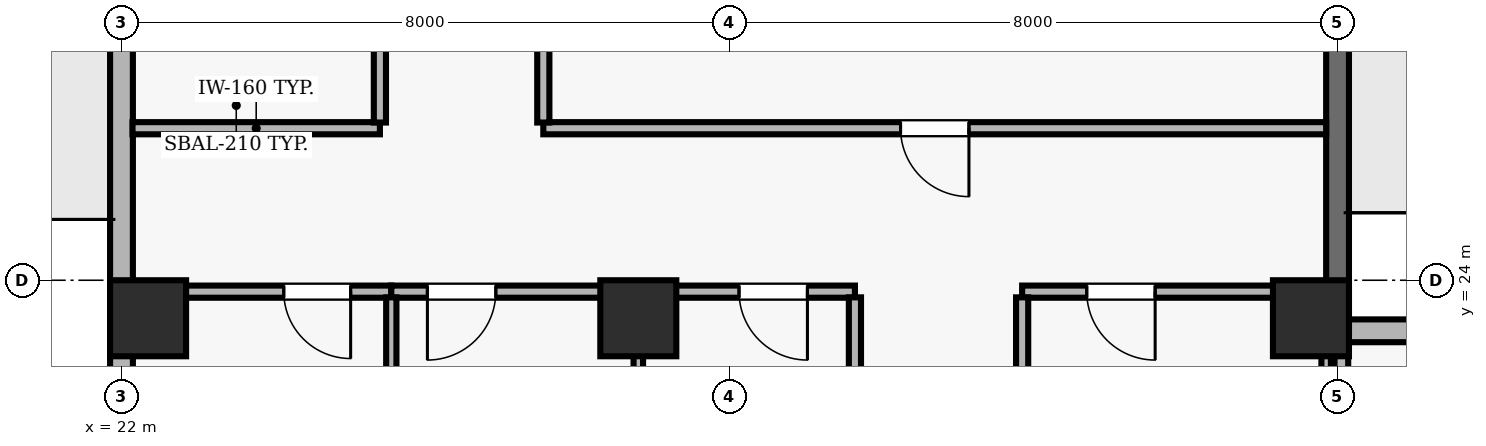
"""IFC4 building model, lengths in metres.
Left out: names, types, materials, properties, quantities, classifications, styles, units other than length and angle.
Written with IfcOpenShell. Run it as: python <this file> out.ifc"""

import sys

from ifc_helpers import new_model, si_unit, direction, frame, frame_2d, origin, origin_2d, place, context, subcontext, project, spatial, rectangle, extrude, element, fill, save


model = new_model("IFC4")
c1 = context("Model", 3, precision=1e-05, world=origin(), true_north=direction((0.0, 1.0)))
c2 = subcontext(c1, "Body", "Model", "MODEL_VIEW")
j1 = project(units=[si_unit("LENGTHUNIT", "METRE"), si_unit("PLANEANGLEUNIT", "RADIAN")], contexts=[c1])
p1 = place(None, origin())
s1 = spatial("IfcSite", under=j1, at=p1, CompositionType="ELEMENT")
p2 = place(p1, origin())
s2 = spatial("IfcBuilding", under=s1, at=p2, CompositionType="ELEMENT")
p3 = place(p2, frame((0.0, 0.0, 195.3)))
s3 = spatial("IfcBuildingStorey", under=s2, at=p3, CompositionType="ELEMENT", Elevation=195.3)
for number, where, z_axis, x_axis in (
    (1, (22.35, 23.5, 0.0), (0.0, 0.0, 1.0), (1.0, 0.0, 0.0)),
    (2, (28.8, 23.5, 0.0), (0.0, 0.0, 1.0), (1.0, 0.0, 0.0)),
    (3, (37.65, 23.5, 0.0), (0.0, 0.0, 1.0), (1.0, 0.0, 0.0)),
):
    element("IfcColumn", number, at=place(p3, frame(where, z_axis=z_axis, x_axis=x_axis)), inside=s3, PredefinedType="COLUMN", context=c2, shape_type="SweptSolid", body=[
        extrude(rectangle(XDim=1.0, YDim=1.0, at=origin_2d()), origin(), (0.0, 0.0, 1.0), 3.9),
    ])
p4 = place(p3, frame((45.9, 23.335, 0.0), z_axis=(0.0, 0.0, 1.0), x_axis=(-1.0, 0.0, 0.0)))
e4 = element("IfcWall", 4, at=p4, inside=s3, PredefinedType="SOLIDWALL", context=c2, shape_type="SweptSolid", body=[
    extrude(rectangle(XDim=7.9, YDim=0.3, at=frame_2d((3.95, 0.0))), origin(), (0.0, 0.0, 1.0), 3.69),
])
p5 = place(p4, frame((3.05, 0.0, 0.9)))
e5 = element("IfcOpeningElement", 5, at=p5, cuts=e4, PredefinedType="OPENING", context=c2, shape_type="SweptSolid", body=[
    extrude(rectangle(XDim=1.8, YDim=1.8, at=frame_2d((0.9, 0.9))), frame((0.0, 0.16, 0.0), z_axis=(0.0, -1.0, 0.0), x_axis=(1.0, 0.0, 0.0)), (0.0, 0.0, 1.0), 0.32),
])
p6 = place(p3, frame((38.0, 23.335, 0.0), z_axis=(0.0, 0.0, 1.0), x_axis=(0.0, 1.0, 0.0)))
e6 = element("IfcWall", 6, at=p6, inside=s3, PredefinedType="SOLIDWALL", context=c2, shape_type="SweptSolid", body=[
    extrude(rectangle(XDim=17.365, YDim=0.3, at=frame_2d((8.683, 0.0))), origin(), (0.0, 0.0, 1.0), 3.69),
])
p7 = place(p6, frame((8.609, 0.0, 0.0)))
e7 = element("IfcOpeningElement", 7, at=p7, cuts=e6, PredefinedType="OPENING", context=c2, shape_type="SweptSolid", body=[
    extrude(rectangle(XDim=1.0, YDim=2.2, at=frame_2d((0.5, 1.1))), frame((0.0, 0.16, 0.0), z_axis=(0.0, -1.0, 0.0), x_axis=(1.0, 0.0, 0.0)), (0.0, 0.0, 1.0), 0.32),
])
p8 = place(p6, frame((13.271, 0.0, 0.9)))
e8 = element("IfcOpeningElement", 8, at=p8, cuts=e6, PredefinedType="OPENING", context=c2, shape_type="SweptSolid", body=[
    extrude(rectangle(XDim=2.4, YDim=1.8, at=frame_2d((1.2, 0.9))), frame((0.0, 0.16, 0.0), z_axis=(0.0, -1.0, 0.0), x_axis=(1.0, 0.0, 0.0)), (0.0, 0.0, 1.0), 0.32),
])
p9 = place(p3, frame((22.0, 40.7, 0.0), z_axis=(0.0, 0.0, 1.0), x_axis=(0.0, -1.0, 0.0)))
e9 = element("IfcWall", 9, at=p9, inside=s3, PredefinedType="SOLIDWALL", context=c2, shape_type="SweptSolid", body=[
    extrude(rectangle(XDim=38.2, YDim=0.3, at=frame_2d((19.1, 0.0))), origin(), (0.0, 0.0, 1.0), 3.69),
])
p10 = place(p9, frame((7.8, 0.0, 0.0)))
e10 = element("IfcOpeningElement", 10, at=p10, cuts=e9, PredefinedType="OPENING", context=c2, shape_type="SweptSolid", body=[
    extrude(rectangle(XDim=1.0, YDim=2.2, at=frame_2d((0.5, 1.1))), frame((0.0, 0.16, 0.0), z_axis=(0.0, -1.0, 0.0), x_axis=(1.0, 0.0, 0.0)), (0.0, 0.0, 1.0), 0.32),
])
p11 = place(p9, frame((1.229, 0.0, 0.9)))
e11 = element("IfcOpeningElement", 11, at=p11, cuts=e9, PredefinedType="OPENING", context=c2, shape_type="SweptSolid", body=[
    extrude(rectangle(XDim=3.0, YDim=2.2, at=frame_2d((1.5, 1.1))), frame((0.0, 0.16, 0.0), z_axis=(0.0, -1.0, 0.0), x_axis=(1.0, 0.0, 0.0)), (0.0, 0.0, 1.0), 0.32),
])
p12 = place(p9, frame((18.05, 0.0, 0.9)))
e12 = element("IfcOpeningElement", 12, at=p12, cuts=e9, PredefinedType="OPENING", context=c2, shape_type="SweptSolid", body=[
    extrude(rectangle(XDim=3.0, YDim=2.2, at=frame_2d((1.5, 1.1))), frame((0.0, 0.16, 0.0), z_axis=(0.0, -1.0, 0.0), x_axis=(1.0, 0.0, 0.0)), (0.0, 0.0, 1.0), 0.32),
])
p13 = place(p9, frame((28.514, 0.0, 0.9)))
e13 = element("IfcOpeningElement", 13, at=p13, cuts=e9, PredefinedType="OPENING", context=c2, shape_type="SweptSolid", body=[
    extrude(rectangle(XDim=3.0, YDim=2.2, at=frame_2d((1.5, 1.1))), frame((0.0, 0.16, 0.0), z_axis=(0.0, -1.0, 0.0), x_axis=(1.0, 0.0, 0.0)), (0.0, 0.0, 1.0), 0.32),
])
p14 = place(p3, frame((25.4, 26.0, 0.0), z_axis=(0.0, 0.0, 1.0), x_axis=(-1.0, 0.0, 0.0)))
e14 = element("IfcWall", 14, at=p14, inside=s3, PredefinedType="PARTITIONING", context=c2, shape_type="SweptSolid", body=[
    extrude(rectangle(XDim=3.255, YDim=0.16, at=frame_2d((1.627, 0.0))), origin(), (0.0, 0.0, 1.0), 3.69),
])
p15 = place(p3, frame((25.55, 23.85, 0.0), z_axis=(0.0, 0.0, 1.0), x_axis=(-1.0, 0.0, 0.0)))
e15 = element("IfcWall", 15, at=p15, inside=s3, PredefinedType="PARTITIONING", context=c2, shape_type="SweptSolid", body=[
    extrude(rectangle(XDim=3.35, YDim=0.16, at=frame_2d((1.675, 0.0))), origin(), (0.0, 0.0, 1.0), 3.146),
])
p16 = place(p15, frame((0.535, 0.0, 0.0)))
e16 = element("IfcOpeningElement", 16, at=p16, cuts=e15, PredefinedType="OPENING", context=c2, shape_type="SweptSolid", body=[
    extrude(rectangle(XDim=0.88, YDim=2.1, at=frame_2d((0.44, 1.05))), frame((0.0, 0.09, 0.0), z_axis=(0.0, -1.0, 0.0), x_axis=(1.0, 0.0, 0.0)), (0.0, 0.0, 1.0), 0.18),
])
p17 = place(p3, frame((28.8, 23.85, 0.0), z_axis=(0.0, 0.0, 1.0), x_axis=(-1.0, 0.0, 0.0)))
e17 = element("IfcWall", 17, at=p17, inside=s3, PredefinedType="PARTITIONING", context=c2, shape_type="SweptSolid", body=[
    extrude(rectangle(XDim=3.25, YDim=0.16, at=frame_2d((1.625, 0.0))), origin(), (0.0, 0.0, 1.0), 3.146),
])
p18 = place(p17, frame((1.875, 0.0, 0.0)))
e18 = element("IfcOpeningElement", 18, at=p18, cuts=e17, PredefinedType="OPENING", context=c2, shape_type="SweptSolid", body=[
    extrude(rectangle(XDim=0.9, YDim=2.1, at=frame_2d((0.45, 1.05))), frame((0.0, 0.09, 0.0), z_axis=(0.0, -1.0, 0.0), x_axis=(1.0, 0.0, 0.0)), (0.0, 0.0, 1.0), 0.18),
])
p19 = place(p3, frame((31.65, 23.85, 0.0), z_axis=(0.0, 0.0, 1.0), x_axis=(-1.0, 0.0, 0.0)))
e19 = element("IfcWall", 19, at=p19, inside=s3, PredefinedType="PARTITIONING", context=c2, shape_type="SweptSolid", body=[
    extrude(rectangle(XDim=2.85, YDim=0.16, at=frame_2d((1.425, 0.0))), origin(), (0.0, 0.0, 1.0), 3.146),
])
p20 = place(p19, frame((0.625, 0.0, 0.0)))
e20 = element("IfcOpeningElement", 20, at=p20, cuts=e19, PredefinedType="OPENING", context=c2, shape_type="SweptSolid", body=[
    extrude(rectangle(XDim=0.9, YDim=2.1, at=frame_2d((0.45, 1.05))), frame((0.0, 0.09, 0.0), z_axis=(0.0, -1.0, 0.0), x_axis=(1.0, 0.0, 0.0)), (0.0, 0.0, 1.0), 0.18),
])
p21 = place(p3, frame((37.85, 23.85, 0.0), z_axis=(0.0, 0.0, 1.0), x_axis=(-1.0, 0.0, 0.0)))
e21 = element("IfcWall", 21, at=p21, inside=s3, PredefinedType="PARTITIONING", context=c2, shape_type="SweptSolid", body=[
    extrude(rectangle(XDim=4.0, YDim=0.16, at=frame_2d((2.0, 0.0))), origin(), (0.0, 0.0, 1.0), 3.146),
])
p22 = place(p21, frame((2.25, 0.0, 0.0)))
e22 = element("IfcOpeningElement", 22, at=p22, cuts=e21, PredefinedType="OPENING", context=c2, shape_type="SweptSolid", body=[
    extrude(rectangle(XDim=0.9, YDim=2.1, at=frame_2d((0.45, 1.05))), frame((0.0, 0.09, 0.0), z_axis=(0.0, -1.0, 0.0), x_axis=(1.0, 0.0, 0.0)), (0.0, 0.0, 1.0), 0.18),
])
p23 = place(p3, frame((37.85, 26.0, 0.0), z_axis=(0.0, 0.0, 1.0), x_axis=(-1.0, 0.0, 0.0)))
e23 = element("IfcWall", 23, at=p23, inside=s3, PredefinedType="PARTITIONING", context=c2, shape_type="SweptSolid", body=[
    extrude(rectangle(XDim=10.3, YDim=0.16, at=frame_2d((5.15, 0.0))), origin(), (0.0, 0.0, 1.0), 3.69),
])
p24 = place(p23, frame((4.7, 0.0, 0.0)))
e24 = element("IfcOpeningElement", 24, at=p24, cuts=e23, PredefinedType="OPENING", context=c2, shape_type="SweptSolid", body=[
    extrude(rectangle(XDim=0.9, YDim=2.1, at=frame_2d((0.45, 1.05))), frame((0.0, 0.09, 0.0), z_axis=(0.0, -1.0, 0.0), x_axis=(1.0, 0.0, 0.0)), (0.0, 0.0, 1.0), 0.18),
])
p25 = place(p3, frame((25.4, 34.21, 0.0), z_axis=(0.0, 0.0, 1.0), x_axis=(0.0, -1.0, 0.0)))
e25 = element("IfcWall", 25, at=p25, inside=s3, PredefinedType="PARTITIONING", context=c2, shape_type="SweptSolid", body=[
    extrude(rectangle(XDim=8.135, YDim=0.16, at=frame_2d((4.067, 0.0))), origin(), (0.0, 0.0, 1.0), 3.69),
])
p26 = place(p25, frame((3.618, 0.0, 0.0)))
e26 = element("IfcOpeningElement", 26, at=p26, cuts=e25, PredefinedType="OPENING", context=c2, shape_type="SweptSolid", body=[
    extrude(rectangle(XDim=0.9, YDim=2.1, at=frame_2d((0.45, 1.05))), frame((0.0, 0.09, 0.0), z_axis=(0.0, -1.0, 0.0), x_axis=(1.0, 0.0, 0.0)), (0.0, 0.0, 1.0), 0.18),
])
p27 = place(p3, frame((25.55, 19.16, 0.0), z_axis=(0.0, 0.0, 1.0), x_axis=(0.0, 1.0, 0.0)))
e27 = element("IfcWall", 27, at=p27, inside=s3, PredefinedType="PARTITIONING", context=c2, shape_type="SweptSolid", body=[
    extrude(rectangle(XDim=4.615, YDim=0.135, at=frame_2d((2.308, 0.0))), origin(), (0.0, 0.0, 1.0), 3.69),
])
p28 = place(p3, frame((27.55, 26.075, 0.0), z_axis=(0.0, 0.0, 1.0), x_axis=(0.0, 1.0, 0.0)))
e28 = element("IfcWall", 28, at=p28, inside=s3, PredefinedType="PARTITIONING", context=c2, shape_type="SweptSolid", body=[
    extrude(rectangle(XDim=8.1, YDim=0.16, at=frame_2d((4.05, 0.0))), origin(), (0.0, 0.0, 1.0), 3.69),
])
p29 = place(p3, frame((28.8, 23.775, 0.0), z_axis=(0.0, 0.0, 1.0), x_axis=(0.0, -1.0, 0.0)))
e29 = element("IfcWall", 29, at=p29, inside=s3, PredefinedType="PARTITIONING", context=c2, shape_type="SweptSolid", body=[
    extrude(rectangle(XDim=2.267, YDim=0.125, at=frame_2d((1.133, 0.0))), origin(), (0.0, 0.0, 1.0), 3.69),
])
p30 = place(p3, frame((31.65, 23.775, 0.0), z_axis=(0.0, 0.0, 1.0), x_axis=(0.0, -1.0, 0.0)))
e30 = element("IfcWall", 30, at=p30, inside=s3, PredefinedType="PARTITIONING", context=c2, shape_type="SweptSolid", body=[
    extrude(rectangle(XDim=2.267, YDim=0.16, at=frame_2d((1.133, 0.0))), origin(), (0.0, 0.0, 1.0), 3.69),
])
p31 = place(p3, frame((33.85, 20.835, 0.0), z_axis=(0.0, 0.0, 1.0), x_axis=(0.0, 1.0, 0.0)))
e31 = element("IfcWall", 31, at=p31, inside=s3, PredefinedType="PARTITIONING", context=c2, shape_type="SweptSolid", body=[
    extrude(rectangle(XDim=2.94, YDim=0.16, at=frame_2d((1.47, 0.0))), origin(), (0.0, 0.0, 1.0), 3.69),
])
p32 = place(p3, frame((37.85, 20.835, 0.0), z_axis=(0.0, 0.0, 1.0), x_axis=(0.0, 1.0, 0.0)))
e32 = element("IfcWall", 32, at=p32, inside=s3, PredefinedType="PARTITIONING", context=c2, shape_type="SweptSolid", body=[
    extrude(rectangle(XDim=2.5, YDim=0.125, at=frame_2d((1.25, 0.0))), origin(), (0.0, 0.0, 1.0), 3.146),
])
p33 = place(p3, frame((38.05, 23.19, 0.0), z_axis=(0.0, 0.0, 1.0), x_axis=(0.0, -1.0, 0.0)))
e33 = element("IfcWall", 33, at=p33, inside=s3, PredefinedType="PARTITIONING", context=c2, shape_type="SweptSolid", body=[
    extrude(rectangle(XDim=7.115, YDim=0.18, at=frame_2d((3.558, 0.0))), origin(), (0.0, 0.0, 1.0), 3.146),
])
p34 = place(p22, origin())
e34 = element("IfcDoor", 34, at=p34, inside=s3, OperationType="SINGLE_SWING_LEFT", PredefinedType="DOOR", context=c2, shape_type="SweptSolid", body=[
    extrude(rectangle(XDim=0.9, YDim=2.1, at=frame_2d((0.45, 1.05))), frame((0.0, 0.025, 0.0), z_axis=(0.0, -1.0, 0.0), x_axis=(1.0, 0.0, 0.0)), (0.0, 0.0, 1.0), 0.05),
])
fill(e22, e34)
p35 = place(p20, origin())
e35 = element("IfcDoor", 35, at=p35, inside=s3, OperationType="SINGLE_SWING_LEFT", PredefinedType="DOOR", context=c2, shape_type="SweptSolid", body=[
    extrude(rectangle(XDim=0.9, YDim=2.1, at=frame_2d((0.45, 1.05))), frame((0.0, 0.025, 0.0), z_axis=(0.0, -1.0, 0.0), x_axis=(1.0, 0.0, 0.0)), (0.0, 0.0, 1.0), 0.05),
])
fill(e20, e35)
p36 = place(p16, origin())
e36 = element("IfcDoor", 36, at=p36, inside=s3, OperationType="SINGLE_SWING_LEFT", PredefinedType="DOOR", context=c2, shape_type="SweptSolid", body=[
    extrude(rectangle(XDim=0.88, YDim=2.1, at=frame_2d((0.44, 1.05))), frame((0.0, 0.025, 0.0), z_axis=(0.0, -1.0, 0.0), x_axis=(1.0, 0.0, 0.0)), (0.0, 0.0, 1.0), 0.05),
])
fill(e16, e36)
p37 = place(p18, origin())
e37 = element("IfcDoor", 37, at=p37, inside=s3, OperationType="SINGLE_SWING_RIGHT", PredefinedType="DOOR", context=c2, shape_type="SweptSolid", body=[
    extrude(rectangle(XDim=0.9, YDim=2.1, at=frame_2d((0.45, 1.05))), frame((0.0, 0.025, 0.0), z_axis=(0.0, -1.0, 0.0), x_axis=(1.0, 0.0, 0.0)), (0.0, 0.0, 1.0), 0.05),
])
fill(e18, e37)
p38 = place(p24, origin())
e38 = element("IfcDoor", 38, at=p38, inside=s3, OperationType="SINGLE_SWING_LEFT", PredefinedType="DOOR", context=c2, shape_type="SweptSolid", body=[
    extrude(rectangle(XDim=0.9, YDim=2.1, at=frame_2d((0.45, 1.05))), frame((0.0, 0.025, 0.0), z_axis=(0.0, -1.0, 0.0), x_axis=(1.0, 0.0, 0.0)), (0.0, 0.0, 1.0), 0.05),
])
fill(e24, e38)
save(model, sys.argv[1])
